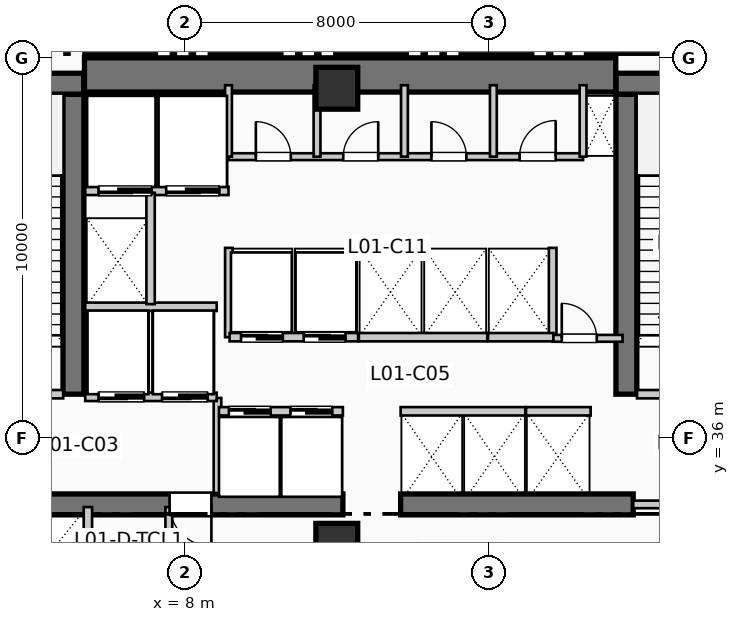
"""IFC4 building model, lengths in metres.
Left out: names, types, materials, properties, quantities, classifications, styles, units other than length and angle.
Written with IfcOpenShell. Run it as: python <this file> out.ifc"""

import sys

from ifc_helpers import new_model, si_unit, direction, frame, frame_2d, origin, origin_2d, place, context, subcontext, project, spatial, rectangle, extrude, element, fill, save


model = new_model("IFC4")
c1 = context("Model", 3, precision=1e-05, world=origin(), true_north=direction((0.0, 1.0)))
c2 = subcontext(c1, "Body", "Model", "MODEL_VIEW")
j1 = project(units=[si_unit("LENGTHUNIT", "METRE"), si_unit("PLANEANGLEUNIT", "RADIAN")], contexts=[c1])
p1 = place(None, origin())
s1 = spatial("IfcSite", under=j1, at=p1, CompositionType="ELEMENT")
p2 = place(p1, origin())
s2 = spatial("IfcBuilding", under=s1, at=p2, CompositionType="ELEMENT")
p3 = place(p2, frame((0.0, 0.0, 5.94)))
s3 = spatial("IfcBuildingStorey", under=s2, at=p3, CompositionType="ELEMENT", Elevation=5.94)
p4 = place(p3, frame((5.36, 45.55, 0.0), z_axis=(0.0, 0.0, 1.0), x_axis=(1.0, 0.0, 0.0)))
e1 = element("IfcWall", 1, at=p4, inside=s3, PredefinedType="SHEAR", context=c2, shape_type="SweptSolid", body=[
    extrude(rectangle(XDim=13.98, YDim=0.9, at=frame_2d((6.99, 0.0))), origin(), (0.0, 0.0, 1.0), 5.28),
])
p5 = place(p3, frame((1.45, 34.25, 0.0), z_axis=(0.0, 0.0, 1.0), x_axis=(1.0, 0.0, 0.0)))
e2 = element("IfcWall", 2, at=p5, inside=s3, PredefinedType="SHEAR", context=c2, shape_type="SweptSolid", body=[
    extrude(rectangle(XDim=10.71, YDim=0.55, at=frame_2d((5.355, 0.0))), origin(), (0.0, 0.0, 1.0), 5.28),
])
p6 = place(p5, frame((7.25, 0.0, 0.0), z_axis=(0.0, 0.0, 1.0), x_axis=(-1.0, 0.0, 0.0)))
e3 = element("IfcOpeningElement", 3, at=p6, cuts=e2, PredefinedType="OPENING", context=c2, shape_type="SweptSolid", body=[
    extrude(rectangle(XDim=1.1, YDim=2.15, at=frame_2d((0.55, 1.075))), frame((0.0, 0.285, 0.0), z_axis=(0.0, -1.0, 0.0), x_axis=(1.0, 0.0, 0.0)), (0.0, 0.0, 1.0), 0.57),
])
p7 = place(p3, frame((13.68, 34.25, 0.0), z_axis=(0.0, 0.0, 1.0), x_axis=(1.0, 0.0, 0.0)))
e4 = element("IfcWall", 4, at=p7, inside=s3, PredefinedType="SHEAR", context=c2, shape_type="SweptSolid", body=[
    extrude(rectangle(XDim=6.12, YDim=0.55, at=frame_2d((3.06, 0.0))), origin(), (0.0, 0.0, 1.0), 5.28),
])
p8 = place(p3, frame((5.07, 37.15, 0.0), z_axis=(0.0, 0.0, 1.0), x_axis=(0.0, 1.0, 0.0)))
e5 = element("IfcWall", 5, at=p8, inside=s3, PredefinedType="SHEAR", context=c2, shape_type="SweptSolid", body=[
    extrude(rectangle(XDim=7.89, YDim=0.55, at=frame_2d((3.945, 0.0))), origin(), (0.0, 0.0, 1.0), 5.28),
])
p9 = place(p3, frame((1.1, 45.32, 0.0), z_axis=(0.0, 0.0, 1.0), x_axis=(1.0, 0.0, 0.0)))
e6 = element("IfcWall", 6, at=p9, inside=s3, PredefinedType="SHEAR", context=c2, shape_type="SweptSolid", body=[
    extrude(rectangle(XDim=4.24, YDim=0.55, at=frame_2d((2.12, 0.0))), origin(), (0.0, 0.0, 1.0), 5.28),
])
p10 = place(p3, frame((19.62, 37.15, 0.0), z_axis=(0.0, 0.0, 1.0), x_axis=(0.0, 1.0, 0.0)))
e7 = element("IfcWall", 7, at=p10, inside=s3, PredefinedType="SHEAR", context=c2, shape_type="SweptSolid", body=[
    extrude(rectangle(XDim=7.89, YDim=0.55, at=frame_2d((3.945, 0.0))), origin(), (0.0, 0.0, 1.0), 5.28),
])
p11 = place(p3, frame((19.35, 45.32, 0.0), z_axis=(0.0, 0.0, 1.0), x_axis=(1.0, 0.0, 0.0)))
e8 = element("IfcWall", 8, at=p11, inside=s3, PredefinedType="SHEAR", context=c2, shape_type="SweptSolid", body=[
    extrude(rectangle(XDim=3.69, YDim=0.55, at=frame_2d((1.845, 0.0))), origin(), (0.0, 0.0, 1.0), 5.28),
])
for number, where, z_axis, x_axis in (
    (9, (12.0, 33.2, 0.0), (0.0, 0.0, 1.0), (1.0, 0.0, 0.0)),
    (10, (12.0, 45.2, 0.0), (0.0, 0.0, 1.0), (1.0, 0.0, 0.0)),
):
    element("IfcColumn", number, at=place(p3, frame(where, z_axis=z_axis, x_axis=x_axis)), inside=s3, PredefinedType="COLUMN", context=c2, shape_type="SweptSolid", body=[
        extrude(rectangle(XDim=1.1, YDim=1.1, at=origin_2d()), origin(), (0.0, 0.0, 1.0), 5.28),
    ])
p12 = place(p3, frame((1.65, 37.15, 0.0), z_axis=(0.0, 0.0, 1.0), x_axis=(1.0, 0.0, 0.0)))
e11 = element("IfcWall", 11, at=p12, inside=s3, PredefinedType="PARTITIONING", context=c2, shape_type="SweptSolid", body=[
    extrude(rectangle(XDim=3.15, YDim=0.22, at=frame_2d((1.575, 0.0))), origin(), (0.0, 0.0, 1.0), 4.96),
])
p13 = place(p12, frame((2.05, 0.0, 0.0), z_axis=(0.0, 0.0, 1.0), x_axis=(-1.0, 0.0, 0.0)))
e12 = element("IfcOpeningElement", 12, at=p13, cuts=e11, PredefinedType="OPENING", context=c2, shape_type="SweptSolid", body=[
    extrude(rectangle(XDim=1.05, YDim=2.15, at=frame_2d((0.525, 1.075))), frame((0.0, 0.12, 0.0), z_axis=(0.0, -1.0, 0.0), x_axis=(1.0, 0.0, 0.0)), (0.0, 0.0, 1.0), 0.24),
])
p14 = place(p3, frame((8.86, 34.55, 0.0), z_axis=(0.0, 0.0, 1.0), x_axis=(0.0, 1.0, 0.0)))
e13 = element("IfcWall", 13, at=p14, inside=s3, PredefinedType="PARTITIONING", context=c2, shape_type="SweptSolid", body=[
    extrude(rectangle(XDim=2.5, YDim=0.2, at=frame_2d((1.25, 0.0))), origin(), (0.0, 0.0, 1.0), 4.96),
])
p15 = place(p3, frame((19.9, 37.15, 0.0), z_axis=(0.0, 0.0, 1.0), x_axis=(1.0, 0.0, 0.0)))
e14 = element("IfcWall", 14, at=p15, inside=s3, PredefinedType="PARTITIONING", context=c2, shape_type="SweptSolid", body=[
    extrude(rectangle(XDim=3.15, YDim=0.22, at=frame_2d((1.575, 0.0))), origin(), (0.0, 0.0, 1.0), 4.96),
])
p16 = place(p15, frame((2.05, 0.0, 0.0), z_axis=(0.0, 0.0, 1.0), x_axis=(-1.0, 0.0, 0.0)))
e15 = element("IfcOpeningElement", 15, at=p16, cuts=e14, PredefinedType="OPENING", context=c2, shape_type="SweptSolid", body=[
    extrude(rectangle(XDim=1.05, YDim=2.15, at=frame_2d((0.525, 1.075))), frame((0.0, 0.12, 0.0), z_axis=(0.0, -1.0, 0.0), x_axis=(1.0, 0.0, 0.0)), (0.0, 0.0, 1.0), 0.24),
])
p17 = place(p3, frame((19.8, 34.25, 0.0), z_axis=(0.0, 0.0, 1.0), x_axis=(1.0, 0.0, 0.0)))
e16 = element("IfcWall", 16, at=p17, inside=s3, PredefinedType="PARTITIONING", context=c2, shape_type="SweptSolid", body=[
    extrude(rectangle(XDim=3.25, YDim=0.2, at=frame_2d((1.625, 0.0))), origin(), (0.0, 0.0, 1.0), 4.96),
])
p18 = place(p17, frame((2.15, 0.0, 0.0), z_axis=(0.0, 0.0, 1.0), x_axis=(-1.0, 0.0, 0.0)))
e17 = element("IfcOpeningElement", 17, at=p18, cuts=e16, PredefinedType="OPENING", context=c2, shape_type="SweptSolid", body=[
    extrude(rectangle(XDim=1.1, YDim=2.15, at=frame_2d((0.55, 1.075))), frame((0.0, 0.11, 0.0), z_axis=(0.0, -1.0, 0.0), x_axis=(1.0, 0.0, 0.0)), (0.0, 0.0, 1.0), 0.22),
])
p19 = place(p3, frame((5.38, 37.08, 0.0), z_axis=(0.0, 0.0, 1.0), x_axis=(1.0, 0.0, 0.0)))
e18 = element("IfcWall", 18, at=p19, inside=s3, PredefinedType="PARTITIONING", context=c2, shape_type="SweptSolid", body=[
    extrude(rectangle(XDim=3.46, YDim=0.22, at=frame_2d((1.73, 0.0))), origin(), (0.0, 0.0, 1.0), 4.96),
])
p20 = place(p19, frame((1.55, 0.0, 0.0), z_axis=(0.0, 0.0, 1.0), x_axis=(-1.0, 0.0, 0.0)))
e19 = element("IfcOpeningElement", 19, at=p20, cuts=e18, PredefinedType="OPENING", context=c2, shape_type="SweptSolid", body=[
    extrude(rectangle(XDim=1.2, YDim=2.2, at=frame_2d((0.6, 1.1))), frame((0.0, 0.12, 0.0), z_axis=(0.0, -1.0, 0.0), x_axis=(1.0, 0.0, 0.0)), (0.0, 0.0, 1.0), 0.24),
])
p21 = place(p19, frame((3.22, 0.0, 0.0), z_axis=(0.0, 0.0, 1.0), x_axis=(-1.0, 0.0, 0.0)))
e20 = element("IfcOpeningElement", 20, at=p21, cuts=e18, PredefinedType="OPENING", context=c2, shape_type="SweptSolid", body=[
    extrude(rectangle(XDim=1.2, YDim=2.2, at=frame_2d((0.6, 1.1))), frame((0.0, 0.12, 0.0), z_axis=(0.0, -1.0, 0.0), x_axis=(1.0, 0.0, 0.0)), (0.0, 0.0, 1.0), 0.24),
])
p22 = place(p3, frame((5.38, 39.45, 0.0), z_axis=(0.0, 0.0, 1.0), x_axis=(1.0, 0.0, 0.0)))
e21 = element("IfcWall", 21, at=p22, inside=s3, PredefinedType="PARTITIONING", context=c2, shape_type="SweptSolid", body=[
    extrude(rectangle(XDim=3.46, YDim=0.22, at=frame_2d((1.73, 0.0))), origin(), (0.0, 0.0, 1.0), 4.96),
])
p23 = place(p3, frame((5.38, 42.5, 0.0), z_axis=(0.0, 0.0, 1.0), x_axis=(1.0, 0.0, 0.0)))
e22 = element("IfcWall", 22, at=p23, inside=s3, PredefinedType="PARTITIONING", context=c2, shape_type="SweptSolid", body=[
    extrude(rectangle(XDim=3.77, YDim=0.22, at=frame_2d((1.885, 0.0))), origin(), (0.0, 0.0, 1.0), 4.96),
])
p24 = place(p23, frame((1.75, 0.0, 0.0), z_axis=(0.0, 0.0, 1.0), x_axis=(-1.0, 0.0, 0.0)))
e23 = element("IfcOpeningElement", 23, at=p24, cuts=e22, PredefinedType="OPENING", context=c2, shape_type="SweptSolid", body=[
    extrude(rectangle(XDim=1.4, YDim=2.2, at=frame_2d((0.7, 1.1))), frame((0.0, 0.12, 0.0), z_axis=(0.0, -1.0, 0.0), x_axis=(1.0, 0.0, 0.0)), (0.0, 0.0, 1.0), 0.24),
])
p25 = place(p23, frame((3.53, 0.0, 0.0), z_axis=(0.0, 0.0, 1.0), x_axis=(-1.0, 0.0, 0.0)))
e24 = element("IfcOpeningElement", 24, at=p25, cuts=e22, PredefinedType="OPENING", context=c2, shape_type="SweptSolid", body=[
    extrude(rectangle(XDim=1.4, YDim=2.2, at=frame_2d((0.7, 1.1))), frame((0.0, 0.12, 0.0), z_axis=(0.0, -1.0, 0.0), x_axis=(1.0, 0.0, 0.0)), (0.0, 0.0, 1.0), 0.24),
])
p26 = place(p3, frame((7.1, 39.52, 0.0), z_axis=(0.0, 0.0, 1.0), x_axis=(0.0, 1.0, 0.0)))
e25 = element("IfcWall", 25, at=p26, inside=s3, PredefinedType="PARTITIONING", context=c2, shape_type="SweptSolid", body=[
    extrude(rectangle(XDim=2.93, YDim=0.22, at=frame_2d((1.465, 0.0))), origin(), (0.0, 0.0, 1.0), 4.96),
])
p27 = place(p3, frame((5.45, 31.8, 0.0), z_axis=(0.0, 0.0, 1.0), x_axis=(0.0, 1.0, 0.0)))
e26 = element("IfcWall", 26, at=p27, inside=s3, PredefinedType="PARTITIONING", context=c2, shape_type="SweptSolid", body=[
    extrude(rectangle(XDim=2.38, YDim=0.22, at=frame_2d((1.19, 0.0))), origin(), (0.0, 0.0, 1.0), 4.96),
])
for number, where, z_axis, x_axis in (
    (27, (9.16, 38.65, 0.0), (0.0, 0.0, 1.0), (0.0, 1.0, 0.0)),
    (28, (17.68, 38.65, 0.0), (0.0, 0.0, 1.0), (0.0, 1.0, 0.0)),
):
    element("IfcWall", number, at=place(p3, frame(where, z_axis=z_axis, x_axis=x_axis)), inside=s3, PredefinedType="PARTITIONING", context=c2, shape_type="SweptSolid", body=[
        extrude(rectangle(XDim=2.35, YDim=0.2, at=frame_2d((1.175, 0.0))), origin(), (0.0, 0.0, 1.0), 4.96),
    ])
p28 = place(p3, frame((17.68, 38.62, 0.0), z_axis=(0.0, 0.0, 1.0), x_axis=(1.0, 0.0, 0.0)))
e29 = element("IfcWall", 29, at=p28, inside=s3, PredefinedType="PARTITIONING", context=c2, shape_type="SweptSolid", body=[
    extrude(rectangle(XDim=1.84, YDim=0.18, at=frame_2d((0.92, 0.0))), origin(), (0.0, 0.0, 1.0), 4.96),
])
p29 = place(p28, frame((0.24, 0.0, 0.0)))
e30 = element("IfcOpeningElement", 30, at=p29, cuts=e29, PredefinedType="OPENING", context=c2, shape_type="SweptSolid", body=[
    extrude(rectangle(XDim=0.92, YDim=2.1, at=frame_2d((0.46, 1.05))), frame((0.0, 0.1, 0.0), z_axis=(0.0, -1.0, 0.0), x_axis=(1.0, 0.0, 0.0)), (0.0, 0.0, 1.0), 0.2),
])
p30 = place(p3, frame((7.58, 31.82, 0.0), z_axis=(0.0, 0.0, 1.0), x_axis=(0.0, 1.0, 0.0)))
e31 = element("IfcWall", 31, at=p30, inside=s3, PredefinedType="PLUMBINGWALL", context=c2, shape_type="SweptSolid", body=[
    extrude(rectangle(XDim=2.36, YDim=0.18, at=frame_2d((1.18, 0.0))), origin(), (0.0, 0.0, 1.0), 4.96),
])
p31 = place(p3, frame((8.9, 36.7, 0.0), z_axis=(0.0, 0.0, 1.0), x_axis=(1.0, 0.0, 0.0)))
e32 = element("IfcWall", 32, at=p31, inside=s3, PredefinedType="PARTITIONING", context=c2, shape_type="SweptSolid", body=[
    extrude(rectangle(XDim=3.26, YDim=0.22, at=frame_2d((1.63, 0.0))), origin(), (0.0, 0.0, 1.0), 4.96),
])
p32 = place(p31, frame((0.26, 0.0, 0.0)))
e33 = element("IfcOpeningElement", 33, at=p32, cuts=e32, PredefinedType="OPENING", context=c2, shape_type="SweptSolid", body=[
    extrude(rectangle(XDim=1.1, YDim=2.2, at=frame_2d((0.55, 1.1))), frame((0.0, 0.12, 0.0), z_axis=(0.0, -1.0, 0.0), x_axis=(1.0, 0.0, 0.0)), (0.0, 0.0, 1.0), 0.24),
])
p33 = place(p31, frame((1.88, 0.0, 0.0)))
e34 = element("IfcOpeningElement", 34, at=p33, cuts=e32, PredefinedType="OPENING", context=c2, shape_type="SweptSolid", body=[
    extrude(rectangle(XDim=1.1, YDim=2.2, at=frame_2d((0.55, 1.1))), frame((0.0, 0.12, 0.0), z_axis=(0.0, -1.0, 0.0), x_axis=(1.0, 0.0, 0.0)), (0.0, 0.0, 1.0), 0.24),
])
p34 = place(p3, frame((9.18, 38.65, 0.0), z_axis=(0.0, 0.0, 1.0), x_axis=(1.0, 0.0, 0.0)))
e35 = element("IfcWall", 35, at=p34, inside=s3, PredefinedType="PARTITIONING", context=c2, shape_type="SweptSolid", body=[
    extrude(rectangle(XDim=3.38, YDim=0.22, at=frame_2d((1.69, 0.0))), origin(), (0.0, 0.0, 1.0), 4.96),
])
p35 = place(p34, frame((0.3, 0.0, 0.0)))
e36 = element("IfcOpeningElement", 36, at=p35, cuts=e35, PredefinedType="OPENING", context=c2, shape_type="SweptSolid", body=[
    extrude(rectangle(XDim=1.1, YDim=2.2, at=frame_2d((0.55, 1.1))), frame((0.0, 0.12, 0.0), z_axis=(0.0, -1.0, 0.0), x_axis=(1.0, 0.0, 0.0)), (0.0, 0.0, 1.0), 0.24),
])
p36 = place(p34, frame((1.95, 0.0, 0.0)))
e37 = element("IfcOpeningElement", 37, at=p36, cuts=e35, PredefinedType="OPENING", context=c2, shape_type="SweptSolid", body=[
    extrude(rectangle(XDim=1.1, YDim=2.2, at=frame_2d((0.55, 1.1))), frame((0.0, 0.12, 0.0), z_axis=(0.0, -1.0, 0.0), x_axis=(1.0, 0.0, 0.0)), (0.0, 0.0, 1.0), 0.24),
])
p37 = place(p3, frame((13.68, 36.7, 0.0), z_axis=(0.0, 0.0, 1.0), x_axis=(1.0, 0.0, 0.0)))
e38 = element("IfcWall", 38, at=p37, inside=s3, PredefinedType="PARTITIONING", context=c2, shape_type="SweptSolid", body=[
    extrude(rectangle(XDim=3.28, YDim=0.22, at=frame_2d((1.64, 0.0))), origin(), (0.0, 0.0, 1.0), 4.96),
])
p38 = place(p3, frame((12.58, 38.65, 0.0), z_axis=(0.0, 0.0, 1.0), x_axis=(1.0, 0.0, 0.0)))
e39 = element("IfcWall", 39, at=p38, inside=s3, PredefinedType="PARTITIONING", context=c2, shape_type="SweptSolid", body=[
    extrude(rectangle(XDim=3.38, YDim=0.22, at=frame_2d((1.69, 0.0))), origin(), (0.0, 0.0, 1.0), 4.96),
])
p39 = place(p3, frame((16.98, 36.7, 0.0), z_axis=(0.0, 0.0, 1.0), x_axis=(1.0, 0.0, 0.0)))
e40 = element("IfcWall", 40, at=p39, inside=s3, PredefinedType="PARTITIONING", context=c2, shape_type="SweptSolid", body=[
    extrude(rectangle(XDim=1.7, YDim=0.22, at=frame_2d((0.85, 0.0))), origin(), (0.0, 0.0, 1.0), 4.96),
])
p40 = place(p3, frame((15.98, 38.65, 0.0), z_axis=(0.0, 0.0, 1.0), x_axis=(1.0, 0.0, 0.0)))
e41 = element("IfcWall", 41, at=p40, inside=s3, PredefinedType="PARTITIONING", context=c2, shape_type="SweptSolid", body=[
    extrude(rectangle(XDim=1.72, YDim=0.22, at=frame_2d((0.86, 0.0))), origin(), (0.0, 0.0, 1.0), 4.96),
])
p41 = place(p3, frame((9.15, 43.4, 0.0), z_axis=(0.0, 0.0, 1.0), x_axis=(1.0, 0.0, 0.0)))
e42 = element("IfcWall", 42, at=p41, inside=s3, PredefinedType="PLUMBINGWALL", context=c2, shape_type="SweptSolid", body=[
    extrude(rectangle(XDim=9.33, YDim=0.18, at=frame_2d((4.665, 0.0))), origin(), (0.0, 0.0, 1.0), 4.96),
])
p42 = place(p41, frame((0.72, 0.0, 0.0)))
e43 = element("IfcOpeningElement", 43, at=p42, cuts=e42, PredefinedType="OPENING", context=c2, shape_type="SweptSolid", body=[
    extrude(rectangle(XDim=0.92, YDim=2.1, at=frame_2d((0.46, 1.05))), frame((0.0, 0.1, 0.0), z_axis=(0.0, -1.0, 0.0), x_axis=(1.0, 0.0, 0.0)), (0.0, 0.0, 1.0), 0.2),
])
p43 = place(p41, frame((3.02, 0.0, 0.0)))
e44 = element("IfcOpeningElement", 44, at=p43, cuts=e42, PredefinedType="OPENING", context=c2, shape_type="SweptSolid", body=[
    extrude(rectangle(XDim=0.92, YDim=2.1, at=frame_2d((0.46, 1.05))), frame((0.0, 0.1, 0.0), z_axis=(0.0, -1.0, 0.0), x_axis=(1.0, 0.0, 0.0)), (0.0, 0.0, 1.0), 0.2),
])
p44 = place(p41, frame((5.34, 0.0, 0.0)))
e45 = element("IfcOpeningElement", 45, at=p44, cuts=e42, PredefinedType="OPENING", context=c2, shape_type="SweptSolid", body=[
    extrude(rectangle(XDim=0.92, YDim=2.1, at=frame_2d((0.46, 1.05))), frame((0.0, 0.1, 0.0), z_axis=(0.0, -1.0, 0.0), x_axis=(1.0, 0.0, 0.0)), (0.0, 0.0, 1.0), 0.2),
])
p45 = place(p41, frame((7.66, 0.0, 0.0)))
e46 = element("IfcOpeningElement", 46, at=p45, cuts=e42, PredefinedType="OPENING", context=c2, shape_type="SweptSolid", body=[
    extrude(rectangle(XDim=0.95, YDim=2.1, at=frame_2d((0.475, 1.05))), frame((0.0, 0.1, 0.0), z_axis=(0.0, -1.0, 0.0), x_axis=(1.0, 0.0, 0.0)), (0.0, 0.0, 1.0), 0.2),
])
for number, where, z_axis, x_axis in (
    (47, (9.15, 43.4, 0.0), (0.0, 0.0, 1.0), (0.0, 1.0, 0.0)),
    (48, (18.48, 43.4, 0.0), (0.0, 0.0, 1.0), (0.0, 1.0, 0.0)),
    (49, (11.48, 43.4, 0.0), (0.0, 0.0, 1.0), (0.0, 1.0, 0.0)),
    (50, (13.78, 43.4, 0.0), (0.0, 0.0, 1.0), (0.0, 1.0, 0.0)),
    (51, (16.12, 43.4, 0.0), (0.0, 0.0, 1.0), (0.0, 1.0, 0.0)),
):
    element("IfcWall", number, at=place(p3, frame(where, z_axis=z_axis, x_axis=x_axis)), inside=s3, PredefinedType="PLUMBINGWALL", context=c2, shape_type="SweptSolid", body=[
        extrude(rectangle(XDim=1.88, YDim=0.18, at=frame_2d((0.94, 0.0))), origin(), (0.0, 0.0, 1.0), 4.96),
    ])
p46 = place(p6, origin())
e52 = element("IfcDoor", 52, at=p46, inside=s3, OperationType="SINGLE_SWING_RIGHT", PredefinedType="DOOR", context=c2, shape_type="SweptSolid", body=[
    extrude(rectangle(XDim=1.1, YDim=2.15, at=frame_2d((0.55, 1.075))), frame((0.0, 0.025, 0.0), z_axis=(0.0, -1.0, 0.0), x_axis=(1.0, 0.0, 0.0)), (0.0, 0.0, 1.0), 0.05),
])
fill(e3, e52)
p47 = place(p20, origin())
e53 = element("IfcDoor", 53, at=p47, inside=s3, OperationType="SLIDING_TO_RIGHT", PredefinedType="DOOR", context=c2, shape_type="SweptSolid", body=[
    extrude(rectangle(XDim=1.2, YDim=2.2, at=frame_2d((0.6, 1.1))), frame((0.0, 0.025, 0.0), z_axis=(0.0, -1.0, 0.0), x_axis=(1.0, 0.0, 0.0)), (0.0, 0.0, 1.0), 0.05),
])
fill(e19, e53)
p48 = place(p21, origin())
e54 = element("IfcDoor", 54, at=p48, inside=s3, OperationType="SLIDING_TO_RIGHT", PredefinedType="DOOR", context=c2, shape_type="SweptSolid", body=[
    extrude(rectangle(XDim=1.2, YDim=2.2, at=frame_2d((0.6, 1.1))), frame((0.0, 0.025, 0.0), z_axis=(0.0, -1.0, 0.0), x_axis=(1.0, 0.0, 0.0)), (0.0, 0.0, 1.0), 0.05),
])
fill(e20, e54)
p49 = place(p24, origin())
e55 = element("IfcDoor", 55, at=p49, inside=s3, OperationType="SLIDING_TO_LEFT", PredefinedType="DOOR", context=c2, shape_type="SweptSolid", body=[
    extrude(rectangle(XDim=1.4, YDim=2.2, at=frame_2d((0.7, 1.1))), frame((0.0, 0.025, 0.0), z_axis=(0.0, -1.0, 0.0), x_axis=(1.0, 0.0, 0.0)), (0.0, 0.0, 1.0), 0.05),
])
fill(e23, e55)
p50 = place(p25, origin())
e56 = element("IfcDoor", 56, at=p50, inside=s3, OperationType="SLIDING_TO_LEFT", PredefinedType="DOOR", context=c2, shape_type="SweptSolid", body=[
    extrude(rectangle(XDim=1.4, YDim=2.2, at=frame_2d((0.7, 1.1))), frame((0.0, 0.025, 0.0), z_axis=(0.0, -1.0, 0.0), x_axis=(1.0, 0.0, 0.0)), (0.0, 0.0, 1.0), 0.05),
])
fill(e24, e56)
p51 = place(p29, origin())
e57 = element("IfcDoor", 57, at=p51, inside=s3, OperationType="SINGLE_SWING_LEFT", PredefinedType="DOOR", context=c2, shape_type="SweptSolid", body=[
    extrude(rectangle(XDim=0.92, YDim=2.1, at=frame_2d((0.46, 1.05))), frame((0.0, 0.025, 0.0), z_axis=(0.0, -1.0, 0.0), x_axis=(1.0, 0.0, 0.0)), (0.0, 0.0, 1.0), 0.05),
])
fill(e30, e57)
p52 = place(p32, origin())
e58 = element("IfcDoor", 58, at=p52, inside=s3, OperationType="SLIDING_TO_LEFT", PredefinedType="DOOR", context=c2, shape_type="SweptSolid", body=[
    extrude(rectangle(XDim=1.1, YDim=2.2, at=frame_2d((0.55, 1.1))), frame((0.0, 0.025, 0.0), z_axis=(0.0, -1.0, 0.0), x_axis=(1.0, 0.0, 0.0)), (0.0, 0.0, 1.0), 0.05),
])
fill(e33, e58)
p53 = place(p33, origin())
e59 = element("IfcDoor", 59, at=p53, inside=s3, OperationType="SLIDING_TO_LEFT", PredefinedType="DOOR", context=c2, shape_type="SweptSolid", body=[
    extrude(rectangle(XDim=1.1, YDim=2.2, at=frame_2d((0.55, 1.1))), frame((0.0, 0.025, 0.0), z_axis=(0.0, -1.0, 0.0), x_axis=(1.0, 0.0, 0.0)), (0.0, 0.0, 1.0), 0.05),
])
fill(e34, e59)
p54 = place(p35, origin())
e60 = element("IfcDoor", 60, at=p54, inside=s3, OperationType="SLIDING_TO_LEFT", PredefinedType="DOOR", context=c2, shape_type="SweptSolid", body=[
    extrude(rectangle(XDim=1.1, YDim=2.2, at=frame_2d((0.55, 1.1))), frame((0.0, 0.025, 0.0), z_axis=(0.0, -1.0, 0.0), x_axis=(1.0, 0.0, 0.0)), (0.0, 0.0, 1.0), 0.05),
])
fill(e36, e60)
p55 = place(p36, origin())
e61 = element("IfcDoor", 61, at=p55, inside=s3, OperationType="SLIDING_TO_LEFT", PredefinedType="DOOR", context=c2, shape_type="SweptSolid", body=[
    extrude(rectangle(XDim=1.1, YDim=2.2, at=frame_2d((0.55, 1.1))), frame((0.0, 0.025, 0.0), z_axis=(0.0, -1.0, 0.0), x_axis=(1.0, 0.0, 0.0)), (0.0, 0.0, 1.0), 0.05),
])
fill(e37, e61)
p56 = place(p42, origin())
e62 = element("IfcDoor", 62, at=p56, inside=s3, OperationType="SINGLE_SWING_LEFT", PredefinedType="DOOR", context=c2, shape_type="SweptSolid", body=[
    extrude(rectangle(XDim=0.92, YDim=2.1, at=frame_2d((0.46, 1.05))), frame((0.0, 0.025, 0.0), z_axis=(0.0, -1.0, 0.0), x_axis=(1.0, 0.0, 0.0)), (0.0, 0.0, 1.0), 0.05),
])
fill(e43, e62)
p57 = place(p43, origin())
e63 = element("IfcDoor", 63, at=p57, inside=s3, OperationType="SINGLE_SWING_RIGHT", PredefinedType="DOOR", context=c2, shape_type="SweptSolid", body=[
    extrude(rectangle(XDim=0.92, YDim=2.1, at=frame_2d((0.46, 1.05))), frame((0.0, 0.025, 0.0), z_axis=(0.0, -1.0, 0.0), x_axis=(1.0, 0.0, 0.0)), (0.0, 0.0, 1.0), 0.05),
])
fill(e44, e63)
p58 = place(p44, origin())
e64 = element("IfcDoor", 64, at=p58, inside=s3, OperationType="SINGLE_SWING_LEFT", PredefinedType="DOOR", context=c2, shape_type="SweptSolid", body=[
    extrude(rectangle(XDim=0.92, YDim=2.1, at=frame_2d((0.46, 1.05))), frame((0.0, 0.025, 0.0), z_axis=(0.0, -1.0, 0.0), x_axis=(1.0, 0.0, 0.0)), (0.0, 0.0, 1.0), 0.05),
])
fill(e45, e64)
p59 = place(p45, origin())
e65 = element("IfcDoor", 65, at=p59, inside=s3, OperationType="SINGLE_SWING_RIGHT", PredefinedType="DOOR", context=c2, shape_type="SweptSolid", body=[
    extrude(rectangle(XDim=0.95, YDim=2.1, at=frame_2d((0.475, 1.05))), frame((0.0, 0.025, 0.0), z_axis=(0.0, -1.0, 0.0), x_axis=(1.0, 0.0, 0.0)), (0.0, 0.0, 1.0), 0.05),
])
fill(e46, e65)
save(model, sys.argv[1])
